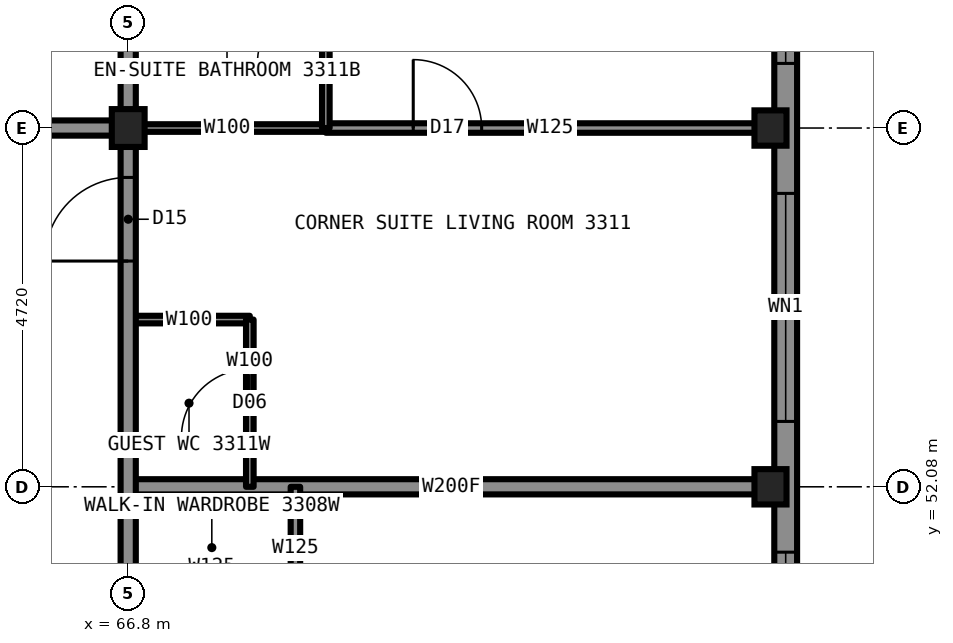
"""IFC4 building model, lengths in metres.
Left out: names, types, materials, properties, quantities, classifications, styles, units other than length and angle.
Written with IfcOpenShell. Run it as: python <this file> out.ifc"""

import sys

from ifc_helpers import new_model, si_unit, direction, frame, frame_2d, origin, origin_2d, place, context, subcontext, project, spatial, rectangle, i_section, extrude, element, fill, save


model = new_model("IFC4")
c1 = context("Model", 3, precision=1e-05, world=origin(), true_north=direction((0.0, 1.0)))
c2 = subcontext(c1, "Body", "Model", "MODEL_VIEW")
j1 = project(units=[si_unit("LENGTHUNIT", "METRE"), si_unit("PLANEANGLEUNIT", "RADIAN")], contexts=[c1])
p1 = place(None, origin())
s1 = spatial("IfcSite", under=j1, at=p1, CompositionType="ELEMENT")
p2 = place(p1, origin())
s2 = spatial("IfcBuilding", under=s1, at=p2, CompositionType="ELEMENT")
p3 = place(p2, frame((0.0, 0.0, 124.9)))
s3 = spatial("IfcBuildingStorey", under=s2, at=p3, CompositionType="ELEMENT", Elevation=124.9)
for number, where, z_axis, x_axis in (
    (1, (75.25, 52.08, 0.0), (0.0, 0.0, 1.0), (1.0, 0.0, 0.0)),
    (2, (75.25, 56.8, 0.0), (0.0, 0.0, 1.0), (1.0, 0.0, 0.0)),
):
    element("IfcColumn", number, at=place(p3, frame(where, z_axis=z_axis, x_axis=x_axis)), inside=s3, PredefinedType="COLUMN", context=c2, shape_type="SweptSolid", body=[
        extrude(i_section(OverallWidth=0.422, OverallDepth=0.465, WebThickness=0.045, FlangeThickness=0.073, at=origin_2d()), origin(), (0.0, 0.0, 1.0), 3.5),
    ])
p4 = place(p3, frame((66.8, 56.8, 0.0), z_axis=(0.0, 0.0, 1.0), x_axis=(1.0, 0.0, 0.0)))
e3 = element("IfcColumn", 3, at=p4, inside=s3, PredefinedType="COLUMN", context=c2, shape_type="SweptSolid", body=[
    extrude(i_section(OverallWidth=0.432, OverallDepth=0.498, WebThickness=0.056, FlangeThickness=0.089, at=origin_2d()), origin(), (0.0, 0.0, 1.0), 3.5),
])
p5 = place(p3, frame((66.8, 56.8, 0.0), z_axis=(0.0, 0.0, 1.0), x_axis=(1.0, 0.0, 0.0)))
e4 = element("IfcWall", 4, at=p5, inside=s3, PredefinedType="PARTITIONING", context=c2, shape_type="SweptSolid", body=[
    extrude(rectangle(XDim=2.6, YDim=0.1, at=frame_2d((1.3, 0.0))), origin(), (0.0, 0.0, 1.0), 2.573),
])
p6 = place(p3, frame((43.2, 56.8, 0.0), z_axis=(0.0, 0.0, 1.0), x_axis=(1.0, 0.0, 0.0)))
e5 = element("IfcWall", 5, at=p6, inside=s3, PredefinedType="PARTITIONING", context=c2, shape_type="SweptSolid", body=[
    extrude(rectangle(XDim=23.6, YDim=0.2, at=frame_2d((11.8, 0.0))), origin(), (0.0, 0.0, 1.0), 3.33),
])
p7 = place(p6, frame((0.7, 0.0, 0.0)))
e6 = element("IfcOpeningElement", 6, at=p7, cuts=e5, PredefinedType="OPENING", context=c2, shape_type="SweptSolid", body=[
    extrude(rectangle(XDim=1.0, YDim=2.2, at=frame_2d((0.5, 1.1))), frame((0.0, 0.11, 0.0), z_axis=(0.0, -1.0, 0.0), x_axis=(1.0, 0.0, 0.0)), (0.0, 0.0, 1.0), 0.22),
])
p8 = place(p6, frame((5.12, 0.0, 0.0)))
e7 = element("IfcOpeningElement", 7, at=p8, cuts=e5, PredefinedType="OPENING", context=c2, shape_type="SweptSolid", body=[
    extrude(rectangle(XDim=1.0, YDim=2.2, at=frame_2d((0.5, 1.1))), frame((0.0, 0.11, 0.0), z_axis=(0.0, -1.0, 0.0), x_axis=(1.0, 0.0, 0.0)), (0.0, 0.0, 1.0), 0.22),
])
p9 = place(p6, frame((12.44, 0.0, 0.0)))
e8 = element("IfcOpeningElement", 8, at=p9, cuts=e5, PredefinedType="OPENING", context=c2, shape_type="SweptSolid", body=[
    extrude(rectangle(XDim=1.0, YDim=2.2, at=frame_2d((0.5, 1.1))), frame((0.0, 0.11, 0.0), z_axis=(0.0, -1.0, 0.0), x_axis=(1.0, 0.0, 0.0)), (0.0, 0.0, 1.0), 0.22),
])
p10 = place(p6, frame((21.14, 0.0, 0.0)))
e9 = element("IfcOpeningElement", 9, at=p10, cuts=e5, PredefinedType="OPENING", context=c2, shape_type="SweptSolid", body=[
    extrude(rectangle(XDim=1.0, YDim=2.2, at=frame_2d((0.5, 1.1))), frame((0.0, 0.11, 0.0), z_axis=(0.0, -1.0, 0.0), x_axis=(1.0, 0.0, 0.0)), (0.0, 0.0, 1.0), 0.22),
])
p11 = place(p3, frame((69.4, 56.8, 0.0), z_axis=(0.0, 0.0, 1.0), x_axis=(1.0, 0.0, 0.0)))
e10 = element("IfcWall", 10, at=p11, inside=s3, PredefinedType="PARTITIONING", context=c2, shape_type="SweptSolid", body=[
    extrude(rectangle(XDim=5.9, YDim=0.125, at=frame_2d((2.95, 0.0))), origin(), (0.0, 0.0, 1.0), 2.573),
])
p12 = place(p11, frame((1.15, 0.0, 0.0)))
e11 = element("IfcOpeningElement", 11, at=p12, cuts=e10, PredefinedType="OPENING", context=c2, shape_type="SweptSolid", body=[
    extrude(rectangle(XDim=0.9, YDim=2.2, at=frame_2d((0.45, 1.1))), frame((0.0, 0.073, 0.0), z_axis=(0.0, -1.0, 0.0), x_axis=(1.0, 0.0, 0.0)), (0.0, 0.0, 1.0), 0.145),
])
p13 = place(p3, frame((66.8, 52.08, 0.0), z_axis=(0.0, 0.0, 1.0), x_axis=(1.0, 0.0, 0.0)))
e12 = element("IfcWall", 12, at=p13, inside=s3, PredefinedType="PARTITIONING", context=c2, shape_type="SweptSolid", body=[
    extrude(rectangle(XDim=8.5, YDim=0.2, at=frame_2d((4.25, 0.0))), origin(), (0.0, 0.0, 1.0), 2.573),
])
p14 = place(p3, frame((66.8, 54.28, 0.0), z_axis=(0.0, 0.0, 1.0), x_axis=(1.0, 0.0, 0.0)))
e13 = element("IfcWall", 13, at=p14, inside=s3, PredefinedType="PARTITIONING", context=c2, shape_type="SweptSolid", body=[
    extrude(rectangle(XDim=1.6, YDim=0.1, at=frame_2d((0.8, 0.0))), origin(), (0.0, 0.0, 1.0), 3.33),
])
p15 = place(p3, frame((66.8, 33.22, 0.0), z_axis=(0.0, 0.0, 1.0), x_axis=(0.0, 1.0, 0.0)))
e14 = element("IfcWall", 14, at=p15, inside=s3, PredefinedType="PARTITIONING", context=c2, shape_type="SweptSolid", body=[
    extrude(rectangle(XDim=23.58, YDim=0.2, at=frame_2d((11.79, 0.0))), origin(), (0.0, 0.0, 1.0), 3.33),
])
p16 = place(p15, frame((7.85, 0.0, 0.0)))
e15 = element("IfcOpeningElement", 15, at=p16, cuts=e14, PredefinedType="OPENING", context=c2, shape_type="SweptSolid", body=[
    extrude(rectangle(XDim=1.0, YDim=2.2, at=frame_2d((0.5, 1.1))), frame((0.0, 0.11, 0.0), z_axis=(0.0, -1.0, 0.0), x_axis=(1.0, 0.0, 0.0)), (0.0, 0.0, 1.0), 0.22),
])
p17 = place(p15, frame((12.42, 0.0, 0.0)))
e16 = element("IfcOpeningElement", 16, at=p17, cuts=e14, PredefinedType="OPENING", context=c2, shape_type="SweptSolid", body=[
    extrude(rectangle(XDim=1.0, YDim=2.2, at=frame_2d((0.5, 1.1))), frame((0.0, 0.11, 0.0), z_axis=(0.0, -1.0, 0.0), x_axis=(1.0, 0.0, 0.0)), (0.0, 0.0, 1.0), 0.22),
])
p18 = place(p15, frame((21.83, 0.0, 0.0)))
e17 = element("IfcOpeningElement", 17, at=p18, cuts=e14, PredefinedType="OPENING", context=c2, shape_type="SweptSolid", body=[
    extrude(rectangle(XDim=1.1, YDim=2.2, at=frame_2d((0.55, 1.1))), frame((0.0, 0.11, 0.0), z_axis=(0.0, -1.0, 0.0), x_axis=(1.0, 0.0, 0.0)), (0.0, 0.0, 1.0), 0.22),
])
p19 = place(p15, frame((0.63, 0.0, 0.0)))
e18 = element("IfcOpeningElement", 18, at=p19, cuts=e14, PredefinedType="OPENING", context=c2, shape_type="SweptSolid", body=[
    extrude(rectangle(XDim=1.1, YDim=2.2, at=frame_2d((0.55, 1.1))), frame((0.0, 0.11, 0.0), z_axis=(0.0, -1.0, 0.0), x_axis=(1.0, 0.0, 0.0)), (0.0, 0.0, 1.0), 0.22),
])
p20 = place(p3, frame((66.8, 56.8, 0.0), z_axis=(0.0, 0.0, 1.0), x_axis=(0.0, 1.0, 0.0)))
e19 = element("IfcWall", 19, at=p20, inside=s3, PredefinedType="PARTITIONING", context=c2, shape_type="SweptSolid", body=[
    extrude(rectangle(XDim=8.5, YDim=0.2, at=frame_2d((4.25, 0.0))), origin(), (0.0, 0.0, 1.0), 2.573),
])
p21 = place(p3, frame((68.4, 52.08, 0.0), z_axis=(0.0, 0.0, 1.0), x_axis=(0.0, 1.0, 0.0)))
e20 = element("IfcWall", 20, at=p21, inside=s3, PredefinedType="PARTITIONING", context=c2, shape_type="SweptSolid", body=[
    extrude(rectangle(XDim=2.2, YDim=0.1, at=frame_2d((1.1, 0.0))), origin(), (0.0, 0.0, 1.0), 3.33),
])
p22 = place(p21, frame((0.65, 0.0, 0.0)))
e21 = element("IfcOpeningElement", 21, at=p22, cuts=e20, PredefinedType="OPENING", context=c2, shape_type="SweptSolid", body=[
    extrude(rectangle(XDim=0.9, YDim=2.1, at=frame_2d((0.45, 1.05))), frame((0.0, 0.06, 0.0), z_axis=(0.0, -1.0, 0.0), x_axis=(1.0, 0.0, 0.0)), (0.0, 0.0, 1.0), 0.12),
])
p23 = place(p3, frame((69.0, 50.48, 0.0), z_axis=(0.0, 0.0, 1.0), x_axis=(0.0, 1.0, 0.0)))
e22 = element("IfcWall", 22, at=p23, inside=s3, PredefinedType="PARTITIONING", context=c2, shape_type="SweptSolid", body=[
    extrude(rectangle(XDim=1.6, YDim=0.125, at=frame_2d((0.8, 0.0))), origin(), (0.0, 0.0, 1.0), 3.33),
])
p24 = place(p3, frame((69.4, 56.8, 0.0), z_axis=(0.0, 0.0, 1.0), x_axis=(0.0, 1.0, 0.0)))
e23 = element("IfcWall", 23, at=p24, inside=s3, PredefinedType="PARTITIONING", context=c2, shape_type="SweptSolid", body=[
    extrude(rectangle(XDim=2.6, YDim=0.1, at=frame_2d((1.3, 0.0))), origin(), (0.0, 0.0, 1.0), 3.33),
])
p25 = place(p24, frame((0.85, 0.0, 0.0)))
e24 = element("IfcOpeningElement", 24, at=p25, cuts=e23, PredefinedType="OPENING", context=c2, shape_type="SweptSolid", body=[
    extrude(rectangle(XDim=0.9, YDim=2.1, at=frame_2d((0.45, 1.05))), frame((0.0, 0.06, 0.0), z_axis=(0.0, -1.0, 0.0), x_axis=(1.0, 0.0, 0.0)), (0.0, 0.0, 1.0), 0.12),
])
p26 = place(p3, frame((75.45, 29.9, 0.0), z_axis=(0.0, 0.0, 1.0), x_axis=(0.0, 1.0, 0.0)))
e25 = element("IfcWall", 25, at=p26, inside=s3, PredefinedType="SOLIDWALL", context=c2, shape_type="SweptSolid", body=[
    extrude(rectangle(XDim=30.2, YDim=0.3, at=frame_2d((15.1, 0.0))), origin(), (0.0, 0.0, 1.0), 2.83),
])
p27 = place(p26, frame((0.85, 0.0, 0.5)))
e26 = element("IfcOpeningElement", 26, at=p27, cuts=e25, PredefinedType="OPENING", context=c2, shape_type="SweptSolid", body=[
    extrude(rectangle(XDim=1.6, YDim=2.0, at=frame_2d((0.8, 1.0))), frame((0.0, 0.16, 0.0), z_axis=(0.0, -1.0, 0.0), x_axis=(1.0, 0.0, 0.0)), (0.0, 0.0, 1.0), 0.32),
])
p28 = place(p26, frame((4.16, 0.0, 0.5)))
e27 = element("IfcOpeningElement", 27, at=p28, cuts=e25, PredefinedType="OPENING", context=c2, shape_type="SweptSolid", body=[
    extrude(rectangle(XDim=3.0, YDim=2.0, at=frame_2d((1.5, 1.0))), frame((0.0, 0.16, 0.0), z_axis=(0.0, -1.0, 0.0), x_axis=(1.0, 0.0, 0.0)), (0.0, 0.0, 1.0), 0.32),
])
p29 = place(p26, frame((8.88, 0.0, 0.5)))
e28 = element("IfcOpeningElement", 28, at=p29, cuts=e25, PredefinedType="OPENING", context=c2, shape_type="SweptSolid", body=[
    extrude(rectangle(XDim=3.0, YDim=2.0, at=frame_2d((1.5, 1.0))), frame((0.0, 0.16, 0.0), z_axis=(0.0, -1.0, 0.0), x_axis=(1.0, 0.0, 0.0)), (0.0, 0.0, 1.0), 0.32),
])
p30 = place(p26, frame((18.32, 0.0, 0.5)))
e29 = element("IfcOpeningElement", 29, at=p30, cuts=e25, PredefinedType="OPENING", context=c2, shape_type="SweptSolid", body=[
    extrude(rectangle(XDim=3.0, YDim=2.0, at=frame_2d((1.5, 1.0))), frame((0.0, 0.16, 0.0), z_axis=(0.0, -1.0, 0.0), x_axis=(1.0, 0.0, 0.0)), (0.0, 0.0, 1.0), 0.32),
])
p31 = place(p26, frame((23.04, 0.0, 0.5)))
e30 = element("IfcOpeningElement", 30, at=p31, cuts=e25, PredefinedType="OPENING", context=c2, shape_type="SweptSolid", body=[
    extrude(rectangle(XDim=3.0, YDim=2.0, at=frame_2d((1.5, 1.0))), frame((0.0, 0.16, 0.0), z_axis=(0.0, -1.0, 0.0), x_axis=(1.0, 0.0, 0.0)), (0.0, 0.0, 1.0), 0.32),
])
p32 = place(p26, frame((27.75, 0.0, 0.5)))
e31 = element("IfcOpeningElement", 31, at=p32, cuts=e25, PredefinedType="OPENING", context=c2, shape_type="SweptSolid", body=[
    extrude(rectangle(XDim=1.6, YDim=2.0, at=frame_2d((0.8, 1.0))), frame((0.0, 0.16, 0.0), z_axis=(0.0, -1.0, 0.0), x_axis=(1.0, 0.0, 0.0)), (0.0, 0.0, 1.0), 0.32),
])
p33 = place(p18, origin())
e32 = element("IfcDoor", 32, at=p33, inside=s3, OperationType="SINGLE_SWING_LEFT", PredefinedType="DOOR", context=c2, shape_type="SweptSolid", body=[
    extrude(rectangle(XDim=1.1, YDim=2.2, at=frame_2d((0.55, 1.1))), frame((0.0, 0.025, 0.0), z_axis=(0.0, -1.0, 0.0), x_axis=(1.0, 0.0, 0.0)), (0.0, 0.0, 1.0), 0.05),
])
fill(e17, e32)
p34 = place(p25, origin())
e33 = element("IfcDoor", 33, at=p34, inside=s3, OperationType="SINGLE_SWING_RIGHT", PredefinedType="DOOR", context=c2, shape_type="SweptSolid", body=[
    extrude(rectangle(XDim=0.9, YDim=2.1, at=frame_2d((0.45, 1.05))), frame((0.0, 0.025, 0.0), z_axis=(0.0, -1.0, 0.0), x_axis=(1.0, 0.0, 0.0)), (0.0, 0.0, 1.0), 0.05),
])
fill(e24, e33)
p35 = place(p12, origin())
e34 = element("IfcDoor", 34, at=p35, inside=s3, OperationType="SINGLE_SWING_LEFT", PredefinedType="DOOR", context=c2, shape_type="SweptSolid", body=[
    extrude(rectangle(XDim=0.9, YDim=2.2, at=frame_2d((0.45, 1.1))), frame((0.0, 0.025, 0.0), z_axis=(0.0, -1.0, 0.0), x_axis=(1.0, 0.0, 0.0)), (0.0, 0.0, 1.0), 0.05),
])
fill(e11, e34)
p36 = place(p22, origin())
e35 = element("IfcDoor", 35, at=p36, inside=s3, OperationType="SINGLE_SWING_LEFT", PredefinedType="DOOR", context=c2, shape_type="SweptSolid", body=[
    extrude(rectangle(XDim=0.9, YDim=2.1, at=frame_2d((0.45, 1.05))), frame((0.0, 0.025, 0.0), z_axis=(0.0, -1.0, 0.0), x_axis=(1.0, 0.0, 0.0)), (0.0, 0.0, 1.0), 0.05),
])
fill(e21, e35)
p37 = place(p30, origin())
e36 = element("IfcWindow", 36, at=p37, inside=s3, PartitioningType="SINGLE_PANEL", PredefinedType="WINDOW", context=c2, shape_type="SweptSolid", body=[
    extrude(rectangle(XDim=3.0, YDim=2.0, at=frame_2d((1.5, 1.0))), frame((0.0, 0.03, 0.0), z_axis=(0.0, -1.0, 0.0), x_axis=(1.0, 0.0, 0.0)), (0.0, 0.0, 1.0), 0.06),
])
fill(e29, e36)
p38 = place(p31, origin())
e37 = element("IfcWindow", 37, at=p38, inside=s3, PartitioningType="SINGLE_PANEL", PredefinedType="WINDOW", context=c2, shape_type="SweptSolid", body=[
    extrude(rectangle(XDim=3.0, YDim=2.0, at=frame_2d((1.5, 1.0))), frame((0.0, 0.03, 0.0), z_axis=(0.0, -1.0, 0.0), x_axis=(1.0, 0.0, 0.0)), (0.0, 0.0, 1.0), 0.06),
])
fill(e30, e37)
p39 = place(p32, origin())
e38 = element("IfcWindow", 38, at=p39, inside=s3, PartitioningType="SINGLE_PANEL", PredefinedType="WINDOW", context=c2, shape_type="SweptSolid", body=[
    extrude(rectangle(XDim=1.6, YDim=2.0, at=frame_2d((0.8, 1.0))), frame((0.0, 0.03, 0.0), z_axis=(0.0, -1.0, 0.0), x_axis=(1.0, 0.0, 0.0)), (0.0, 0.0, 1.0), 0.06),
])
fill(e31, e38)
save(model, sys.argv[1])
